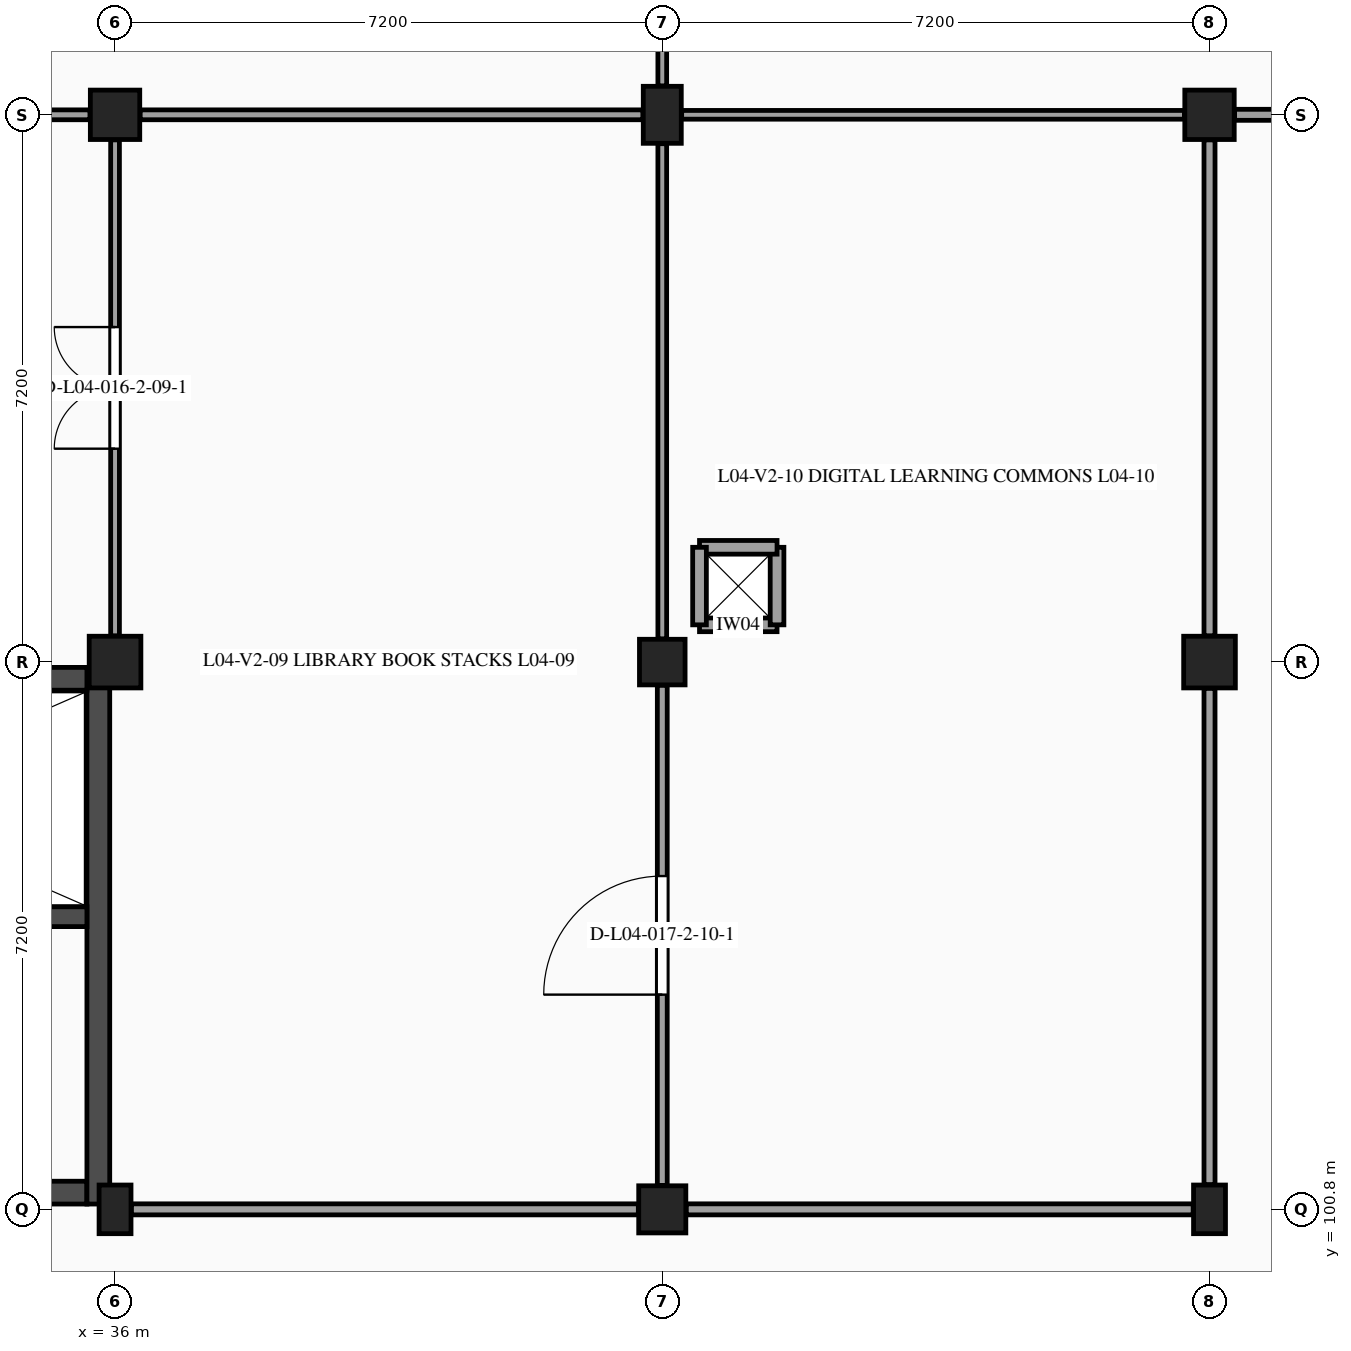
"""IFC4 building model, lengths in metres.
Left out: names, types, materials, properties, quantities, classifications, styles, units other than length and angle.
Written with IfcOpenShell. Run it as: python <this file> out.ifc"""

import sys

from ifc_helpers import new_model, si_unit, direction, frame, frame_2d, origin, origin_2d, place, context, subcontext, project, spatial, rectangle, extrude, element, fill, save


model = new_model("IFC4")
c1 = context("Model", 3, precision=1e-05, world=origin(), true_north=direction((0.0, 1.0)))
c2 = subcontext(c1, "Body", "Model", "MODEL_VIEW")
j1 = project(units=[si_unit("LENGTHUNIT", "METRE"), si_unit("PLANEANGLEUNIT", "RADIAN")], contexts=[c1])
p1 = place(None, origin())
s1 = spatial("IfcSite", under=j1, at=p1, CompositionType="ELEMENT")
p2 = place(p1, origin())
s2 = spatial("IfcBuilding", under=s1, at=p2, CompositionType="ELEMENT")
p3 = place(p2, frame((0.0, 0.0, 18.6)))
s3 = spatial("IfcBuildingStorey", under=s2, at=p3, CompositionType="ELEMENT", Elevation=18.6)
p4 = place(p3, frame((36.0, 100.8, 0.0), z_axis=(0.0, 0.0, 1.0), x_axis=(1.0, 0.0, 0.0)))
e1 = element("IfcColumn", 1, at=p4, inside=s3, PredefinedType="PILASTER", context=c2, shape_type="SweptSolid", body=[
    extrude(rectangle(XDim=0.42, YDim=0.64, at=origin_2d()), origin(), (0.0, 0.0, 1.0), 4.2),
])
p5 = place(p3, frame((36.0, 108.0, 0.0), z_axis=(0.0, 0.0, 1.0), x_axis=(1.0, 0.0, 0.0)))
e2 = element("IfcColumn", 2, at=p5, inside=s3, PredefinedType="COLUMN", context=c2, shape_type="SweptSolid", body=[
    extrude(rectangle(XDim=0.68, YDim=0.68, at=origin_2d()), origin(), (0.0, 0.0, 1.0), 4.2),
])
p6 = place(p3, frame((36.0, 115.2, 0.0), z_axis=(0.0, 0.0, 1.0), x_axis=(1.0, 0.0, 0.0)))
e3 = element("IfcColumn", 3, at=p6, inside=s3, PredefinedType="COLUMN", context=c2, shape_type="SweptSolid", body=[
    extrude(rectangle(XDim=0.65, YDim=0.65, at=origin_2d()), origin(), (0.0, 0.0, 1.0), 4.2),
])
p7 = place(p3, frame((43.2, 100.8, 0.0), z_axis=(0.0, 0.0, 1.0), x_axis=(1.0, 0.0, 0.0)))
e4 = element("IfcColumn", 4, at=p7, inside=s3, PredefinedType="COLUMN", context=c2, shape_type="SweptSolid", body=[
    extrude(rectangle(XDim=0.62, YDim=0.62, at=origin_2d()), origin(), (0.0, 0.0, 1.0), 4.2),
])
p8 = place(p3, frame((43.2, 108.0, 0.0), z_axis=(0.0, 0.0, 1.0), x_axis=(1.0, 0.0, 0.0)))
e5 = element("IfcColumn", 5, at=p8, inside=s3, PredefinedType="COLUMN", context=c2, shape_type="SweptSolid", body=[
    extrude(rectangle(XDim=0.6, YDim=0.6, at=origin_2d()), origin(), (0.0, 0.0, 1.0), 4.2),
])
p9 = place(p3, frame((43.2, 115.2, 0.0), z_axis=(0.0, 0.0, 1.0), x_axis=(1.0, 0.0, 0.0)))
e6 = element("IfcColumn", 6, at=p9, inside=s3, PredefinedType="COLUMN", context=c2, shape_type="SweptSolid", body=[
    extrude(rectangle(XDim=0.5, YDim=0.75, at=origin_2d()), origin(), (0.0, 0.0, 1.0), 4.2),
])
p10 = place(p3, frame((50.4, 100.8, 0.0), z_axis=(0.0, 0.0, 1.0), x_axis=(1.0, 0.0, 0.0)))
e7 = element("IfcColumn", 7, at=p10, inside=s3, PredefinedType="PILASTER", context=c2, shape_type="SweptSolid", body=[
    extrude(rectangle(XDim=0.42, YDim=0.64, at=origin_2d()), origin(), (0.0, 0.0, 1.0), 4.2),
])
p11 = place(p3, frame((50.4, 108.0, 0.0), z_axis=(0.0, 0.0, 1.0), x_axis=(1.0, 0.0, 0.0)))
e8 = element("IfcColumn", 8, at=p11, inside=s3, PredefinedType="COLUMN", context=c2, shape_type="SweptSolid", body=[
    extrude(rectangle(XDim=0.68, YDim=0.68, at=origin_2d()), origin(), (0.0, 0.0, 1.0), 4.2),
])
p12 = place(p3, frame((50.4, 115.2, 0.0), z_axis=(0.0, 0.0, 1.0), x_axis=(1.0, 0.0, 0.0)))
e9 = element("IfcColumn", 9, at=p12, inside=s3, PredefinedType="COLUMN", context=c2, shape_type="SweptSolid", body=[
    extrude(rectangle(XDim=0.65, YDim=0.65, at=origin_2d()), origin(), (0.0, 0.0, 1.0), 4.2),
])
p13 = place(p3, frame((28.95, 101.02, 0.0), z_axis=(0.0, 0.0, 1.0), x_axis=(1.0, 0.0, 0.0)))
e10 = element("IfcWall", 10, at=p13, inside=s3, PredefinedType="SHEAR", context=c2, shape_type="SweptSolid", body=[
    extrude(rectangle(XDim=6.68, YDim=0.3, at=frame_2d((3.34, 0.0))), origin(), (0.0, 0.0, 1.0), 3.955),
])
p14 = place(p13, frame((2.22, 0.0, 0.0)))
e11 = element("IfcOpeningElement", 11, at=p14, cuts=e10, PredefinedType="OPENING", context=c2, shape_type="SweptSolid", body=[
    extrude(rectangle(XDim=1.8, YDim=2.2, at=frame_2d((0.9, 1.1))), frame((0.0, 0.16, 0.0), z_axis=(0.0, -1.0, 0.0), x_axis=(1.0, 0.0, 0.0)), (0.0, 0.0, 1.0), 0.32),
])
p15 = place(p3, frame((35.78, 100.87, 0.0), z_axis=(0.0, 0.0, 1.0), x_axis=(0.0, 1.0, 0.0)))
e12 = element("IfcWall", 12, at=p15, inside=s3, PredefinedType="SHEAR", context=c2, shape_type="SweptSolid", body=[
    extrude(rectangle(XDim=7.06, YDim=0.3, at=frame_2d((3.53, 0.0))), origin(), (0.0, 0.0, 1.0), 3.955),
])
p16 = place(p3, frame((28.95, 107.78, 0.0), z_axis=(0.0, 0.0, 1.0), x_axis=(1.0, 0.0, 0.0)))
e13 = element("IfcWall", 13, at=p16, inside=s3, PredefinedType="SHEAR", context=c2, shape_type="SweptSolid", body=[
    extrude(rectangle(XDim=6.68, YDim=0.3, at=frame_2d((3.34, 0.0))), origin(), (0.0, 0.0, 1.0), 3.955),
])
p17 = place(p3, frame((28.95, 104.65, 0.0), z_axis=(0.0, 0.0, 1.0), x_axis=(1.0, 0.0, 0.0)))
e14 = element("IfcWall", 14, at=p17, inside=s3, PredefinedType="SHEAR", context=c2, shape_type="SweptSolid", body=[
    extrude(rectangle(XDim=6.68, YDim=0.26, at=frame_2d((3.34, 0.0))), origin(), (0.0, 0.0, 1.0), 3.955),
])
p18 = place(p17, frame((0.95, 0.0, 0.0)))
e15 = element("IfcOpeningElement", 15, at=p18, cuts=e14, PredefinedType="OPENING", context=c2, shape_type="SweptSolid", body=[
    extrude(rectangle(XDim=1.1, YDim=2.2, at=frame_2d((0.55, 1.1))), frame((0.0, 0.14, 0.0), z_axis=(0.0, -1.0, 0.0), x_axis=(1.0, 0.0, 0.0)), (0.0, 0.0, 1.0), 0.28),
])
p19 = place(p17, frame((4.1, 0.0, 0.0)))
e16 = element("IfcOpeningElement", 16, at=p19, cuts=e14, PredefinedType="OPENING", context=c2, shape_type="SweptSolid", body=[
    extrude(rectangle(XDim=1.0, YDim=2.15, at=frame_2d((0.5, 1.075))), frame((0.0, 0.14, 0.0), z_axis=(0.0, -1.0, 0.0), x_axis=(1.0, 0.0, 0.0)), (0.0, 0.0, 1.0), 0.28),
])
for number, where, z_axis, x_axis in (
    (17, (43.69, 108.49, 0.0), (0.0, 0.0, 1.0), (1.0, 0.0, 0.0)),
    (18, (44.71, 108.49, 0.0), (0.0, 0.0, 1.0), (0.0, 1.0, 0.0)),
    (19, (44.71, 109.51, 0.0), (0.0, 0.0, 1.0), (-1.0, 0.0, 0.0)),
    (20, (43.69, 109.51, 0.0), (0.0, 0.0, 1.0), (0.0, -1.0, 0.0)),
):
    element("IfcWall", number, at=place(p3, frame(where, z_axis=z_axis, x_axis=x_axis)), inside=s3, PredefinedType="PARTITIONING", context=c2, shape_type="SweptSolid", body=[
        extrude(rectangle(XDim=1.02, YDim=0.18, at=frame_2d((0.51, 0.0))), origin(), (0.0, 0.0, 1.0), 3.955),
    ])
p20 = place(p3, frame((36.0, 108.345, 0.0), z_axis=(0.0, 0.0, 1.0), x_axis=(0.0, 1.0, 0.0)))
e21 = element("IfcWall", 21, at=p20, inside=s3, PredefinedType="PARTITIONING", context=c2, shape_type="SweptSolid", body=[
    extrude(rectangle(XDim=6.525, YDim=0.115, at=frame_2d((3.263, 0.0))), origin(), (0.0, 0.0, 1.0), 3.26),
])
p21 = place(p20, frame((2.462, 0.0, 0.0)))
e22 = element("IfcOpeningElement", 22, at=p21, cuts=e21, PredefinedType="OPENING", context=c2, shape_type="SweptSolid", body=[
    extrude(rectangle(XDim=1.6, YDim=2.2, at=frame_2d((0.8, 1.1))), frame((0.0, 0.067, 0.0), z_axis=(0.0, -1.0, 0.0), x_axis=(1.0, 0.0, 0.0)), (0.0, 0.0, 1.0), 0.135),
])
p22 = place(p3, frame((29.055, 115.2, 0.0), z_axis=(0.0, 0.0, 1.0), x_axis=(1.0, 0.0, 0.0)))
e23 = element("IfcWall", 23, at=p22, inside=s3, PredefinedType="PARTITIONING", context=c2, shape_type="SweptSolid", body=[
    extrude(rectangle(XDim=6.615, YDim=0.13, at=frame_2d((3.308, 0.0))), origin(), (0.0, 0.0, 1.0), 3.315),
])
p23 = place(p3, frame((36.215, 100.8, 0.0), z_axis=(0.0, 0.0, 1.0), x_axis=(1.0, 0.0, 0.0)))
e24 = element("IfcWall", 24, at=p23, inside=s3, PredefinedType="PARTITIONING", context=c2, shape_type="SweptSolid", body=[
    extrude(rectangle(XDim=6.67, YDim=0.145, at=frame_2d((3.335, 0.0))), origin(), (0.0, 0.0, 1.0), 3.155),
])
p24 = place(p3, frame((43.2, 101.115, 0.0), z_axis=(0.0, 0.0, 1.0), x_axis=(0.0, 1.0, 0.0)))
e25 = element("IfcWall", 25, at=p24, inside=s3, PredefinedType="PARTITIONING", context=c2, shape_type="SweptSolid", body=[
    extrude(rectangle(XDim=6.58, YDim=0.13, at=frame_2d((3.29, 0.0))), origin(), (0.0, 0.0, 1.0), 3.26),
])
p25 = place(p24, frame((2.51, 0.0, 0.0)))
e26 = element("IfcOpeningElement", 26, at=p25, cuts=e25, PredefinedType="OPENING", context=c2, shape_type="SweptSolid", body=[
    extrude(rectangle(XDim=1.56, YDim=2.25, at=frame_2d((0.78, 1.125))), frame((0.0, 0.075, 0.0), z_axis=(0.0, -1.0, 0.0), x_axis=(1.0, 0.0, 0.0)), (0.0, 0.0, 1.0), 0.15),
])
p26 = place(p3, frame((43.2, 108.305, 0.0), z_axis=(0.0, 0.0, 1.0), x_axis=(0.0, 1.0, 0.0)))
e27 = element("IfcWall", 27, at=p26, inside=s3, PredefinedType="PARTITIONING", context=c2, shape_type="SweptSolid", body=[
    extrude(rectangle(XDim=6.515, YDim=0.115, at=frame_2d((3.258, 0.0))), origin(), (0.0, 0.0, 1.0), 3.26),
])
p27 = place(p3, frame((36.33, 115.2, 0.0), z_axis=(0.0, 0.0, 1.0), x_axis=(1.0, 0.0, 0.0)))
e28 = element("IfcWall", 28, at=p27, inside=s3, PredefinedType="PARTITIONING", context=c2, shape_type="SweptSolid", body=[
    extrude(rectangle(XDim=6.615, YDim=0.13, at=frame_2d((3.308, 0.0))), origin(), (0.0, 0.0, 1.0), 3.155),
])
p28 = place(p3, frame((43.2, 115.58, 0.0), z_axis=(0.0, 0.0, 1.0), x_axis=(0.0, 1.0, 0.0)))
e29 = element("IfcWall", 29, at=p28, inside=s3, PredefinedType="PARTITIONING", context=c2, shape_type="SweptSolid", body=[
    extrude(rectangle(XDim=6.495, YDim=0.115, at=frame_2d((3.248, 0.0))), origin(), (0.0, 0.0, 1.0), 3.325),
])
p29 = place(p28, frame((2.558, 0.0, 0.0)))
e30 = element("IfcOpeningElement", 30, at=p29, cuts=e29, PredefinedType="OPENING", context=c2, shape_type="SweptSolid", body=[
    extrude(rectangle(XDim=1.38, YDim=2.22, at=frame_2d((0.69, 1.11))), frame((0.0, 0.067, 0.0), z_axis=(0.0, -1.0, 0.0), x_axis=(1.0, 0.0, 0.0)), (0.0, 0.0, 1.0), 0.135),
])
p30 = place(p3, frame((43.515, 100.8, 0.0), z_axis=(0.0, 0.0, 1.0), x_axis=(1.0, 0.0, 0.0)))
e31 = element("IfcWall", 31, at=p30, inside=s3, PredefinedType="PARTITIONING", context=c2, shape_type="SweptSolid", body=[
    extrude(rectangle(XDim=6.67, YDim=0.145, at=frame_2d((3.335, 0.0))), origin(), (0.0, 0.0, 1.0), 3.175),
])
p31 = place(p3, frame((50.4, 101.125, 0.0), z_axis=(0.0, 0.0, 1.0), x_axis=(0.0, 1.0, 0.0)))
e32 = element("IfcWall", 32, at=p31, inside=s3, PredefinedType="PARTITIONING", context=c2, shape_type="SweptSolid", body=[
    extrude(rectangle(XDim=6.53, YDim=0.145, at=frame_2d((3.265, 0.0))), origin(), (0.0, 0.0, 1.0), 3.26),
])
p32 = place(p3, frame((50.4, 108.345, 0.0), z_axis=(0.0, 0.0, 1.0), x_axis=(0.0, 1.0, 0.0)))
e33 = element("IfcWall", 33, at=p32, inside=s3, PredefinedType="PARTITIONING", context=c2, shape_type="SweptSolid", body=[
    extrude(rectangle(XDim=6.525, YDim=0.145, at=frame_2d((3.263, 0.0))), origin(), (0.0, 0.0, 1.0), 3.26),
])
p33 = place(p3, frame((43.455, 115.2, 0.0), z_axis=(0.0, 0.0, 1.0), x_axis=(1.0, 0.0, 0.0)))
e34 = element("IfcWall", 34, at=p33, inside=s3, PredefinedType="PARTITIONING", context=c2, shape_type="SweptSolid", body=[
    extrude(rectangle(XDim=6.615, YDim=0.115, at=frame_2d((3.308, 0.0))), origin(), (0.0, 0.0, 1.0), 3.175),
])
p34 = place(p3, frame((50.73, 115.2, 0.0), z_axis=(0.0, 0.0, 1.0), x_axis=(1.0, 0.0, 0.0)))
e35 = element("IfcWall", 35, at=p34, inside=s3, PredefinedType="PARTITIONING", context=c2, shape_type="SweptSolid", body=[
    extrude(rectangle(XDim=6.615, YDim=0.145, at=frame_2d((3.308, 0.0))), origin(), (0.0, 0.0, 1.0), 3.205),
])
p35 = place(p21, origin())
e36 = element("IfcDoor", 36, at=p35, inside=s3, OperationType="DOUBLE_DOOR_SINGLE_SWING", PredefinedType="DOOR", context=c2, shape_type="SweptSolid", body=[
    extrude(rectangle(XDim=1.6, YDim=2.2, at=frame_2d((0.8, 1.1))), frame((0.0, 0.025, 0.0), z_axis=(0.0, -1.0, 0.0), x_axis=(1.0, 0.0, 0.0)), (0.0, 0.0, 1.0), 0.05),
])
fill(e22, e36)
p36 = place(p25, origin())
e37 = element("IfcDoor", 37, at=p36, inside=s3, OperationType="SINGLE_SWING_LEFT", PredefinedType="DOOR", context=c2, shape_type="SweptSolid", body=[
    extrude(rectangle(XDim=1.56, YDim=2.25, at=frame_2d((0.78, 1.125))), frame((0.0, 0.025, 0.0), z_axis=(0.0, -1.0, 0.0), x_axis=(1.0, 0.0, 0.0)), (0.0, 0.0, 1.0), 0.05),
])
fill(e26, e37)
save(model, sys.argv[1])
